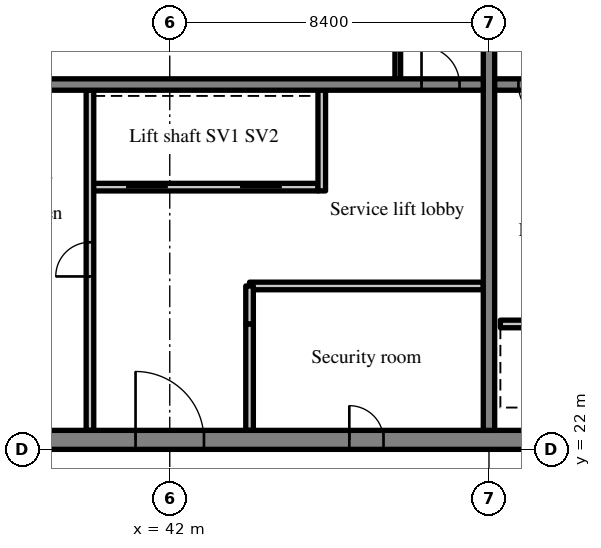
"""IFC4 building model, lengths in metres.
Left out: names, types, materials, properties, quantities, classifications, styles, units other than length and angle.
Written with IfcOpenShell. Run it as: python <this file> out.ifc"""

import sys

from ifc_helpers import new_model, si_unit, direction, frame, frame_2d, origin, place, context, subcontext, project, spatial, rectangle, extrude, source, transform, mapped, element, fill, save


model = new_model("IFC4")
c1 = context("Model", 3, precision=1e-05, world=origin(), true_north=direction((0.0, 1.0)))
c2 = subcontext(c1, "Body", "Model", "MODEL_VIEW")
j1 = project(units=[si_unit("LENGTHUNIT", "METRE"), si_unit("PLANEANGLEUNIT", "RADIAN")], contexts=[c1])
p1 = place(None, origin())
s1 = spatial("IfcSite", under=j1, at=p1, CompositionType="ELEMENT")
p2 = place(p1, origin())
s2 = spatial("IfcBuilding", under=s1, at=p2, CompositionType="ELEMENT")
p3 = place(p2, frame((0.0, 0.0, 293.7)))
s3 = spatial("IfcBuildingStorey", under=s2, at=p3, CompositionType="ELEMENT", Elevation=293.7)
m1 = source(origin(), c2, "Body", "SweptSolid", [
    extrude(rectangle(XDim=50.4, YDim=0.5, at=frame_2d((25.2, 0.0))), origin(), (0.0, 0.0, 1.0), 3.72),
])
p4 = place(p3, frame((25.2, 22.25, 0.0), z_axis=(0.0, 0.0, 1.0), x_axis=(1.0, 0.0, 0.0)))
e1 = element("IfcWall", 1, at=p4, inside=s3, PredefinedType="SHEAR", context=c2, shape_type="MappedRepresentation", body=[
    mapped(m1, transform((0.0, 0.0, 0.0), scale=1.0)),
])
m2 = source(origin(), c2, "Body", "SweptSolid", [
    extrude(rectangle(XDim=1.8, YDim=2.1, at=frame_2d((0.9, 1.05))), frame((0.0, 0.26, 0.0), z_axis=(0.0, -1.0, 0.0), x_axis=(1.0, 0.0, 0.0)), (0.0, 0.0, 1.0), 0.52),
])
p5 = place(p4, frame((15.9, 0.0, 0.0)))
e2 = element("IfcOpeningElement", 2, at=p5, cuts=e1, PredefinedType="OPENING", context=c2, shape_type="MappedRepresentation", body=[
    mapped(m2, transform((0.0, 0.0, 0.0), scale=1.0)),
])
m3 = source(origin(), c2, "Body", "SweptSolid", [
    extrude(rectangle(XDim=0.9, YDim=2.1, at=frame_2d((0.45, 1.05))), frame((0.0, 0.26, 0.0), z_axis=(0.0, -1.0, 0.0), x_axis=(1.0, 0.0, 0.0)), (0.0, 0.0, 1.0), 0.52),
])
p6 = place(p4, frame((9.675, 0.0, 0.0)))
e3 = element("IfcOpeningElement", 3, at=p6, cuts=e1, PredefinedType="OPENING", context=c2, shape_type="MappedRepresentation", body=[
    mapped(m3, transform((0.0, 0.0, 0.0), scale=1.0)),
])
p7 = place(p4, frame((21.525, 0.0, 0.0)))
e4 = element("IfcOpeningElement", 4, at=p7, cuts=e1, PredefinedType="OPENING", context=c2, shape_type="MappedRepresentation", body=[
    mapped(m3, transform((0.0, 0.0, 0.0), scale=1.0)),
])
p8 = place(p4, frame((32.7, 0.0, 0.0)))
e5 = element("IfcOpeningElement", 5, at=p8, cuts=e1, PredefinedType="OPENING", context=c2, shape_type="MappedRepresentation", body=[
    mapped(m2, transform((0.0, 0.0, 0.0), scale=1.0)),
])
m4 = source(origin(), c2, "Body", "SweptSolid", [
    extrude(rectangle(XDim=1.2, YDim=2.1, at=frame_2d((0.6, 1.05))), frame((0.0, 0.26, 0.0), z_axis=(0.0, -1.0, 0.0), x_axis=(1.0, 0.0, 0.0)), (0.0, 0.0, 1.0), 0.52),
])
p9 = place(p4, frame((6.5, 0.0, 0.0)))
e6 = element("IfcOpeningElement", 6, at=p9, cuts=e1, PredefinedType="OPENING", context=c2, shape_type="MappedRepresentation", body=[
    mapped(m4, transform((0.0, 0.0, 0.0), scale=1.0)),
])
p10 = place(p4, frame((47.975, 0.0, 0.0)))
e7 = element("IfcOpeningElement", 7, at=p10, cuts=e1, PredefinedType="OPENING", context=c2, shape_type="MappedRepresentation", body=[
    mapped(m4, transform((0.0, 0.0, 0.0), scale=1.0)),
])
m5 = source(origin(), c2, "Body", "SweptSolid", [
    extrude(rectangle(XDim=19.0, YDim=0.3, at=frame_2d((9.5, 0.0))), origin(), (0.0, 0.0, 1.0), 3.72),
])
p11 = place(p3, frame((50.4, 22.5, 0.0), z_axis=(0.0, 0.0, 1.0), x_axis=(0.0, 1.0, 0.0)))
e8 = element("IfcWall", 8, at=p11, inside=s3, PredefinedType="SHEAR", context=c2, shape_type="MappedRepresentation", body=[
    mapped(m5, transform((0.0, 0.0, 0.0), scale=1.0)),
])
m6 = source(origin(), c2, "Body", "SweptSolid", [
    extrude(rectangle(XDim=1.1, YDim=2.1, at=frame_2d((0.55, 1.05))), frame((0.0, 0.16, 0.0), z_axis=(0.0, -1.0, 0.0), x_axis=(1.0, 0.0, 0.0)), (0.0, 0.0, 1.0), 0.32),
])
p12 = place(p11, frame((12.95, 0.0, 0.0)))
e9 = element("IfcOpeningElement", 9, at=p12, cuts=e8, PredefinedType="OPENING", context=c2, shape_type="MappedRepresentation", body=[
    mapped(m6, transform((0.0, 0.0, 0.0), scale=1.0)),
])
m7 = source(origin(), c2, "Body", "SweptSolid", [
    extrude(rectangle(XDim=16.5, YDim=0.3, at=frame_2d((8.25, 0.0))), origin(), (0.0, 0.0, 1.0), 3.72),
])
p13 = place(p3, frame((33.75, 31.6, 0.0), z_axis=(0.0, 0.0, 1.0), x_axis=(1.0, 0.0, 0.0)))
e10 = element("IfcWall", 10, at=p13, inside=s3, PredefinedType="SHEAR", context=c2, shape_type="MappedRepresentation", body=[
    mapped(m7, transform((0.0, 0.0, 0.0), scale=1.0)),
])
m8 = source(origin(), c2, "Body", "SweptSolid", [
    extrude(rectangle(XDim=1.0, YDim=2.1, at=frame_2d((0.5, 1.05))), frame((0.0, 0.16, 0.0), z_axis=(0.0, -1.0, 0.0), x_axis=(1.0, 0.0, 0.0)), (0.0, 0.0, 1.0), 0.32),
])
p14 = place(p13, frame((14.875, 0.0, 0.0)))
e11 = element("IfcOpeningElement", 11, at=p14, cuts=e10, PredefinedType="OPENING", context=c2, shape_type="MappedRepresentation", body=[
    mapped(m8, transform((0.0, 0.0, 0.0), scale=1.0)),
])
p15 = place(p3, frame((50.55, 31.6, 0.0), z_axis=(0.0, 0.0, 1.0), x_axis=(1.0, 0.0, 0.0)))
e12 = element("IfcWall", 12, at=p15, inside=s3, PredefinedType="SHEAR", context=c2, shape_type="MappedRepresentation", body=[
    mapped(m7, transform((0.0, 0.0, 0.0), scale=1.0)),
])
p16 = place(p15, frame((0.625, 0.0, 0.0)))
e13 = element("IfcOpeningElement", 13, at=p16, cuts=e12, PredefinedType="OPENING", context=c2, shape_type="MappedRepresentation", body=[
    mapped(m8, transform((0.0, 0.0, 0.0), scale=1.0)),
])
m9 = source(origin(), c2, "Body", "SweptSolid", [
    extrude(rectangle(XDim=6.0, YDim=0.2, at=frame_2d((3.0, 0.0))), origin(), (0.0, 0.0, 1.0), 3.72),
])
p17 = place(p3, frame((39.9, 28.9, 0.0), z_axis=(0.0, 0.0, 1.0), x_axis=(1.0, 0.0, 0.0)))
e14 = element("IfcWall", 14, at=p17, inside=s3, PredefinedType="SOLIDWALL", context=c2, shape_type="MappedRepresentation", body=[
    mapped(m9, transform((0.0, 0.0, 0.0), scale=1.0)),
])
m10 = source(origin(), c2, "Body", "SweptSolid", [
    extrude(rectangle(XDim=1.1, YDim=2.1, at=frame_2d((0.55, 1.05))), frame((0.0, 0.11, 0.0), z_axis=(0.0, -1.0, 0.0), x_axis=(1.0, 0.0, 0.0)), (0.0, 0.0, 1.0), 0.22),
])
p18 = place(p17, frame((0.95, 0.0, 0.0)))
e15 = element("IfcOpeningElement", 15, at=p18, cuts=e14, PredefinedType="OPENING", context=c2, shape_type="MappedRepresentation", body=[
    mapped(m10, transform((0.0, 0.0, 0.0), scale=1.0)),
])
p19 = place(p17, frame((3.95, 0.0, 0.0)))
e16 = element("IfcOpeningElement", 16, at=p19, cuts=e14, PredefinedType="OPENING", context=c2, shape_type="MappedRepresentation", body=[
    mapped(m10, transform((0.0, 0.0, 0.0), scale=1.0)),
])
m11 = source(origin(), c2, "Body", "SweptSolid", [
    extrude(rectangle(XDim=8.95, YDim=0.2, at=frame_2d((4.475, 0.0))), origin(), (0.0, 0.0, 1.0), 3.72),
])
p20 = place(p3, frame((39.9, 22.5, 0.0), z_axis=(0.0, 0.0, 1.0), x_axis=(0.0, 1.0, 0.0)))
e17 = element("IfcWall", 17, at=p20, inside=s3, PredefinedType="PARTITIONING", context=c2, shape_type="MappedRepresentation", body=[
    mapped(m11, transform((0.0, 0.0, 0.0), scale=1.0)),
])
m12 = source(origin(), c2, "Body", "SweptSolid", [
    extrude(rectangle(XDim=0.9, YDim=2.1, at=frame_2d((0.45, 1.05))), frame((0.0, 0.11, 0.0), z_axis=(0.0, -1.0, 0.0), x_axis=(1.0, 0.0, 0.0)), (0.0, 0.0, 1.0), 0.22),
])
p21 = place(p20, frame((4.05, 0.0, 0.0)))
e18 = element("IfcOpeningElement", 18, at=p21, cuts=e17, PredefinedType="OPENING", context=c2, shape_type="MappedRepresentation", body=[
    mapped(m12, transform((0.0, 0.0, 0.0), scale=1.0)),
])
m13 = source(origin(), c2, "Body", "SweptSolid", [
    extrude(rectangle(XDim=2.8, YDim=0.2, at=frame_2d((1.4, 0.0))), origin(), (0.0, 0.0, 1.0), 3.72),
])
p22 = place(p3, frame((44.1, 22.5, 0.0), z_axis=(0.0, 0.0, 1.0), x_axis=(0.0, 1.0, 0.0)))
e19 = element("IfcWall", 19, at=p22, inside=s3, PredefinedType="PARTITIONING", context=c2, shape_type="MappedRepresentation", body=[
    mapped(m13, transform((0.0, 0.0, 0.0), scale=1.0)),
])
m14 = source(origin(), c2, "Body", "SweptSolid", [
    extrude(rectangle(XDim=2.65, YDim=0.2, at=frame_2d((1.325, 0.0))), origin(), (0.0, 0.0, 1.0), 3.72),
])
p23 = place(p3, frame((46.0, 28.8, 0.0), z_axis=(0.0, 0.0, 1.0), x_axis=(0.0, 1.0, 0.0)))
e20 = element("IfcWall", 20, at=p23, inside=s3, PredefinedType="SOLIDWALL", context=c2, shape_type="MappedRepresentation", body=[
    mapped(m14, transform((0.0, 0.0, 0.0), scale=1.0)),
])
m15 = source(origin(), c2, "Body", "SweptSolid", [
    extrude(rectangle(XDim=6.15, YDim=0.2, at=frame_2d((3.075, 0.0))), origin(), (0.0, 0.0, 1.0), 3.72),
])
p24 = place(p3, frame((44.1, 26.3, 0.0), z_axis=(0.0, 0.0, 1.0), x_axis=(1.0, 0.0, 0.0)))
e21 = element("IfcWall", 21, at=p24, inside=s3, PredefinedType="PARTITIONING", context=c2, shape_type="MappedRepresentation", body=[
    mapped(m15, transform((0.0, 0.0, 0.0), scale=1.0)),
])
m16 = source(origin(), c2, "Body", "SweptSolid", [
    extrude(rectangle(XDim=1.0, YDim=0.2, at=frame_2d((0.5, 0.0))), origin(), (0.0, 0.0, 1.0), 3.72),
])
p25 = place(p3, frame((44.1, 25.3, 0.0), z_axis=(0.0, 0.0, 1.0), x_axis=(0.0, 1.0, 0.0)))
e22 = element("IfcWall", 22, at=p25, inside=s3, PredefinedType="PARTITIONING", context=c2, shape_type="MappedRepresentation", body=[
    mapped(m16, transform((0.0, 0.0, 0.0), scale=1.0)),
])
m17 = source(origin(), c2, "Body", "SweptSolid", [
    extrude(rectangle(XDim=3.25, YDim=0.15, at=frame_2d((1.625, 0.0))), origin(), (0.0, 0.0, 1.0), 3.72),
])
p26 = place(p3, frame((48.0, 31.75, 0.0), z_axis=(0.0, 0.0, 1.0), x_axis=(0.0, 1.0, 0.0)))
e23 = element("IfcWall", 23, at=p26, inside=s3, PredefinedType="PARTITIONING", context=c2, shape_type="MappedRepresentation", body=[
    mapped(m17, transform((0.0, 0.0, 0.0), scale=1.0)),
])
p27 = place(p3, frame((56.7, 25.3, 0.0), z_axis=(0.0, 0.0, 1.0), x_axis=(-1.0, 0.0, 0.0)))
e24 = element("IfcWall", 24, at=p27, inside=s3, PredefinedType="SOLIDWALL", context=c2, shape_type="MappedRepresentation", body=[
    mapped(m9, transform((0.0, 0.0, 0.0), scale=1.0)),
])
p28 = place(p27, frame((0.95, 0.0, 0.0)))
e25 = element("IfcOpeningElement", 25, at=p28, cuts=e24, PredefinedType="OPENING", context=c2, shape_type="MappedRepresentation", body=[
    mapped(m10, transform((0.0, 0.0, 0.0), scale=1.0)),
])
p29 = place(p27, frame((3.95, 0.0, 0.0)))
e26 = element("IfcOpeningElement", 26, at=p29, cuts=e24, PredefinedType="OPENING", context=c2, shape_type="MappedRepresentation", body=[
    mapped(m10, transform((0.0, 0.0, 0.0), scale=1.0)),
])
m18 = source(origin(), c2, "Body", "SweptSolid", [
    extrude(rectangle(XDim=1.8, YDim=2.1, at=frame_2d((0.9, 1.05))), frame((0.0, 0.175, 0.0), z_axis=(0.0, -1.0, 0.0), x_axis=(1.0, 0.0, 0.0)), (0.0, 0.0, 1.0), 0.05),
])
p30 = place(p5, origin())
e27 = element("IfcDoor", 27, at=p30, inside=s3, OperationType="DOUBLE_DOOR_SINGLE_SWING", PredefinedType="DOOR", context=c2, shape_type="MappedRepresentation", body=[
    mapped(m18, transform((0.0, 0.0, 0.0), scale=1.0)),
])
fill(e2, e27)
m19 = source(origin(), c2, "Body", "SweptSolid", [
    extrude(rectangle(XDim=1.0, YDim=2.1, at=frame_2d((0.5, 1.05))), frame((0.0, 0.025, 0.0), z_axis=(0.0, -1.0, 0.0), x_axis=(1.0, 0.0, 0.0)), (0.0, 0.0, 1.0), 0.05),
])
p31 = place(p14, origin())
e28 = element("IfcDoor", 28, at=p31, inside=s3, OperationType="SINGLE_SWING_LEFT", PredefinedType="DOOR", context=c2, shape_type="MappedRepresentation", body=[
    mapped(m19, transform((0.0, 0.0, 0.0), scale=1.0)),
])
fill(e11, e28)
m20 = source(origin(), c2, "Body", "SweptSolid", [
    extrude(rectangle(XDim=1.1, YDim=2.1, at=frame_2d((0.55, 1.05))), frame((0.0, 0.025, 0.0), z_axis=(0.0, -1.0, 0.0), x_axis=(1.0, 0.0, 0.0)), (0.0, 0.0, 1.0), 0.05),
])
p32 = place(p18, origin())
e29 = element("IfcDoor", 29, at=p32, inside=s3, OperationType="SLIDING_TO_LEFT", PredefinedType="DOOR", context=c2, shape_type="MappedRepresentation", body=[
    mapped(m20, transform((0.0, 0.0, 0.0), scale=1.0)),
])
fill(e15, e29)
p33 = place(p19, origin())
e30 = element("IfcDoor", 30, at=p33, inside=s3, OperationType="SLIDING_TO_RIGHT", PredefinedType="DOOR", context=c2, shape_type="MappedRepresentation", body=[
    mapped(m20, transform((0.0, 0.0, 0.0), scale=1.0)),
])
fill(e16, e30)
m21 = source(origin(), c2, "Body", "SweptSolid", [
    extrude(rectangle(XDim=0.9, YDim=2.1, at=frame_2d((0.45, 1.05))), frame((0.0, 0.025, 0.0), z_axis=(0.0, -1.0, 0.0), x_axis=(1.0, 0.0, 0.0)), (0.0, 0.0, 1.0), 0.05),
])
p34 = place(p21, origin())
e31 = element("IfcDoor", 31, at=p34, inside=s3, OperationType="SINGLE_SWING_LEFT", PredefinedType="DOOR", context=c2, shape_type="MappedRepresentation", body=[
    mapped(m21, transform((0.0, 0.0, 0.0), scale=1.0)),
])
fill(e18, e31)
m22 = source(origin(), c2, "Body", "SweptSolid", [
    extrude(rectangle(XDim=0.9, YDim=2.1, at=frame_2d((0.45, 1.05))), frame((0.0, 0.175, 0.0), z_axis=(0.0, -1.0, 0.0), x_axis=(1.0, 0.0, 0.0)), (0.0, 0.0, 1.0), 0.05),
])
p35 = place(p7, origin())
e32 = element("IfcDoor", 32, at=p35, inside=s3, OperationType="SINGLE_SWING_LEFT", PredefinedType="DOOR", context=c2, shape_type="MappedRepresentation", body=[
    mapped(m22, transform((0.0, 0.0, 0.0), scale=1.0)),
])
fill(e4, e32)
p36 = place(p16, origin())
e33 = element("IfcDoor", 33, at=p36, inside=s3, OperationType="SINGLE_SWING_RIGHT", PredefinedType="DOOR", context=c2, shape_type="MappedRepresentation", body=[
    mapped(m19, transform((0.0, 0.0, 0.0), scale=1.0)),
])
fill(e13, e33)
save(model, sys.argv[1])
